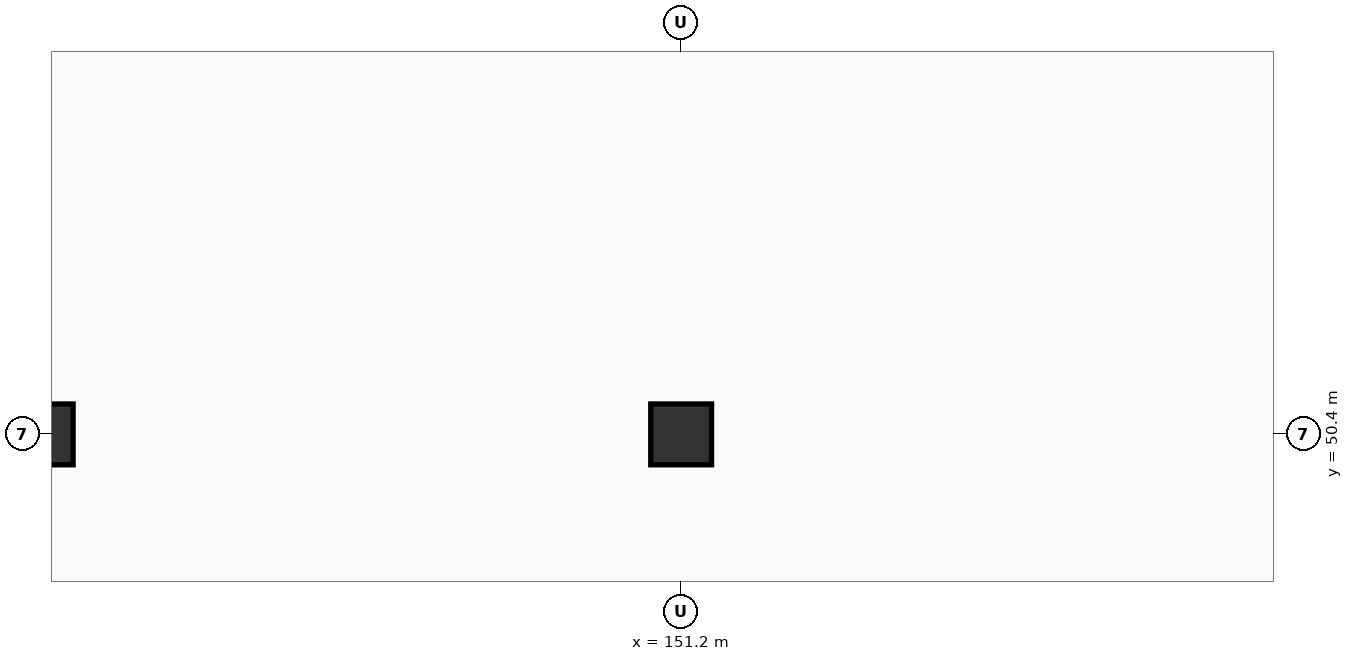
"""IFC4 building model, lengths in metres.
Left out: names, types, materials, properties, quantities, classifications, styles, units other than length and angle.
Written with IfcOpenShell. Run it as: python <this file> out.ifc"""

import sys

from ifc_helpers import new_model, si_unit, direction, frame, origin, origin_2d, place, context, subcontext, project, spatial, rectangle, extrude, element, save


model = new_model("IFC4")
c1 = context("Model", 3, precision=1e-05, world=origin(), true_north=direction((0.0, 1.0)))
c2 = subcontext(c1, "Body", "Model", "MODEL_VIEW")
j1 = project(units=[si_unit("LENGTHUNIT", "METRE"), si_unit("PLANEANGLEUNIT", "RADIAN")], contexts=[c1])
p1 = place(None, origin())
s1 = spatial("IfcSite", under=j1, at=p1, CompositionType="ELEMENT")
p2 = place(p1, origin())
s2 = spatial("IfcBuilding", under=s1, at=p2, CompositionType="ELEMENT")
p3 = place(p2, frame((0.0, 0.0, -4.2)))
s3 = spatial("IfcBuildingStorey", under=s2, at=p3, CompositionType="ELEMENT", Elevation=-4.2)
for number, where, z_axis, x_axis in (
    (1, (142.8, 50.4, 0.0), (0.0, 0.0, 1.0), (1.0, 0.0, 0.0)),
    (2, (151.2, 50.4, 0.0), (0.0, 0.0, 1.0), (1.0, 0.0, 0.0)),
):
    element("IfcColumn", number, at=place(p3, frame(where, z_axis=z_axis, x_axis=x_axis)), inside=s3, PredefinedType="COLUMN", context=c2, shape_type="SweptSolid", body=[
        extrude(rectangle(XDim=0.8, YDim=0.8, at=origin_2d()), origin(), (0.0, 0.0, 1.0), 4.2),
    ])
save(model, sys.argv[1])
